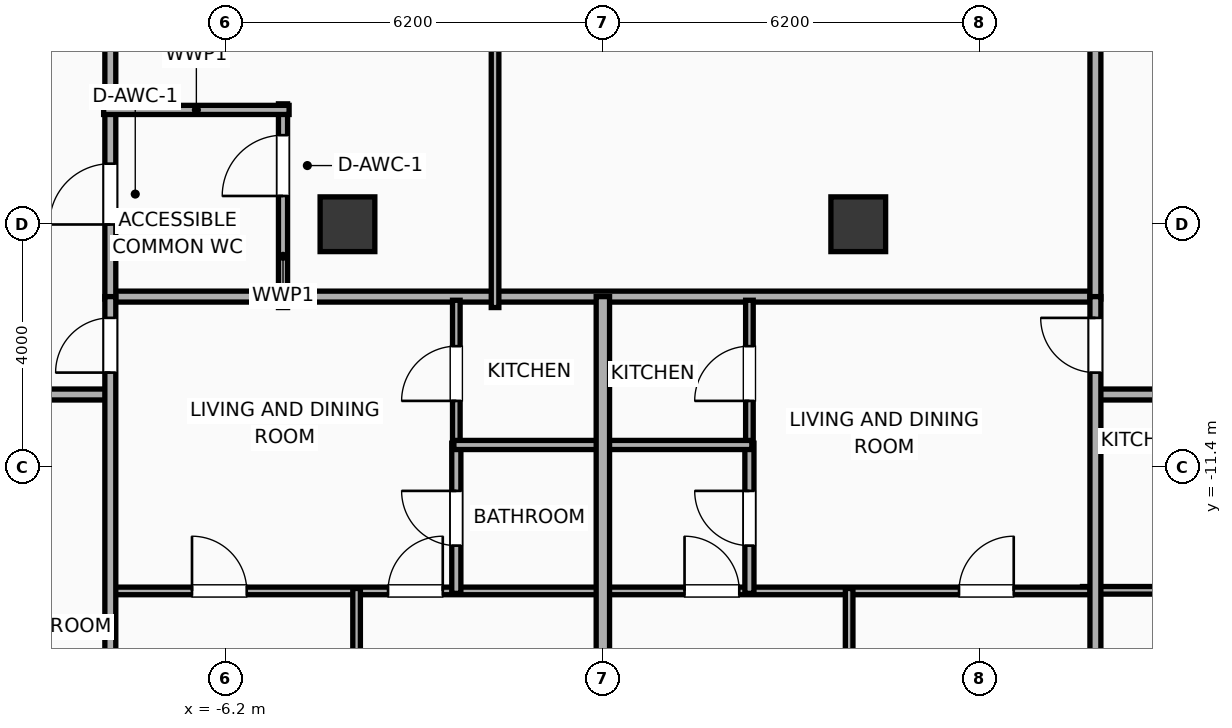
"""IFC4 building model, lengths in metres.
Left out: names, types, materials, properties, quantities, classifications, styles, units other than length and angle.
Written with IfcOpenShell. Run it as: python <this file> out.ifc"""

import sys

from ifc_helpers import new_model, si_unit, direction, frame, frame_2d, origin, origin_2d, place, context, subcontext, project, spatial, rectangle, extrude, element, fill, save


model = new_model("IFC4")
c1 = context("Model", 3, precision=1e-05, world=origin(), true_north=direction((0.0, 1.0)))
c2 = subcontext(c1, "Body", "Model", "MODEL_VIEW")
j1 = project(units=[si_unit("LENGTHUNIT", "METRE"), si_unit("PLANEANGLEUNIT", "RADIAN")], contexts=[c1])
p1 = place(None, origin())
s1 = spatial("IfcSite", under=j1, at=p1, CompositionType="ELEMENT")
p2 = place(p1, origin())
s2 = spatial("IfcBuilding", under=s1, at=p2, CompositionType="ELEMENT")
p3 = place(p2, frame((0.0, 0.0, 295.1)))
s3 = spatial("IfcBuildingStorey", under=s2, at=p3, CompositionType="ELEMENT", Elevation=295.1)
for number, where, z_axis, x_axis in (
    (1, (-4.2, -7.4, 0.0), (0.0, 0.0, 1.0), (1.0, 0.0, 0.0)),
    (2, (4.2, -7.4, 0.0), (0.0, 0.0, 1.0), (1.0, 0.0, 0.0)),
):
    element("IfcColumn", number, at=place(p3, frame(where, z_axis=z_axis, x_axis=x_axis)), inside=s3, PredefinedType="COLUMN", context=c2, shape_type="SweptSolid", body=[
        extrude(rectangle(XDim=0.9, YDim=0.9, at=origin_2d()), origin(), (0.0, 0.0, 1.0), 3.9),
    ])
p4 = place(p3, frame((-8.15, -8.59, 0.0), z_axis=(0.0, 0.0, 1.0), x_axis=(1.0, 0.0, 0.0)))
e3 = element("IfcWall", 3, at=p4, inside=s3, PredefinedType="PARTITIONING", context=c2, shape_type="SweptSolid", body=[
    extrude(rectangle(XDim=16.3, YDim=0.18, at=frame_2d((8.15, 0.0))), origin(), (0.0, 0.0, 1.0), 3.635),
])
p5 = place(p3, frame((-8.1, -8.63, 0.0), z_axis=(0.0, 0.0, 1.0), x_axis=(0.0, 1.0, 0.0)))
e4 = element("IfcWall", 4, at=p5, inside=s3, PredefinedType="PARTITIONING", context=c2, shape_type="SweptSolid", body=[
    extrude(rectangle(XDim=17.26, YDim=0.18, at=frame_2d((8.63, 0.0))), origin(), (0.0, 0.0, 1.0), 3.635),
])
p6 = place(p5, frame((1.226, 0.0, 0.0)))
e5 = element("IfcOpeningElement", 5, at=p6, cuts=e4, PredefinedType="OPENING", context=c2, shape_type="SweptSolid", body=[
    extrude(rectangle(XDim=1.0, YDim=2.05, at=frame_2d((0.5, 1.025))), frame((0.0, 0.1, 0.0), z_axis=(0.0, -1.0, 0.0), x_axis=(1.0, 0.0, 0.0)), (0.0, 0.0, 1.0), 0.2),
])
p7 = place(p5, frame((9.881, 0.0, 0.0)))
e6 = element("IfcOpeningElement", 6, at=p7, cuts=e4, PredefinedType="OPENING", context=c2, shape_type="SweptSolid", body=[
    extrude(rectangle(XDim=0.95, YDim=2.05, at=frame_2d((0.475, 1.025))), frame((0.0, 0.1, 0.0), z_axis=(0.0, -1.0, 0.0), x_axis=(1.0, 0.0, 0.0)), (0.0, 0.0, 1.0), 0.2),
])
p8 = place(p3, frame((8.1, -8.63, 0.0), z_axis=(0.0, 0.0, 1.0), x_axis=(0.0, 1.0, 0.0)))
e7 = element("IfcWall", 7, at=p8, inside=s3, PredefinedType="PARTITIONING", context=c2, shape_type="SweptSolid", body=[
    extrude(rectangle(XDim=17.26, YDim=0.18, at=frame_2d((8.63, 0.0))), origin(), (0.0, 0.0, 1.0), 3.635),
])
p9 = place(p3, frame((-5.26, -8.77, 0.0), z_axis=(0.0, 0.0, 1.0), x_axis=(0.0, 1.0, 0.0)))
e8 = element("IfcWall", 8, at=p9, inside=s3, PredefinedType="PLUMBINGWALL", context=c2, shape_type="SweptSolid", body=[
    extrude(rectangle(XDim=3.35, YDim=0.15, at=frame_2d((1.675, 0.0))), origin(), (0.0, 0.0, 1.0), 3.635),
])
p10 = place(p9, frame((1.835, 0.0, 0.0)))
e9 = element("IfcOpeningElement", 9, at=p10, cuts=e8, PredefinedType="OPENING", context=c2, shape_type="SweptSolid", body=[
    extrude(rectangle(XDim=1.0, YDim=2.05, at=frame_2d((0.5, 1.025))), frame((0.0, 0.085, 0.0), z_axis=(0.0, -1.0, 0.0), x_axis=(1.0, 0.0, 0.0)), (0.0, 0.0, 1.0), 0.17),
])
p11 = place(p3, frame((-8.21, -5.52, 0.0), z_axis=(0.0, 0.0, 1.0), x_axis=(1.0, 0.0, 0.0)))
e10 = element("IfcWall", 10, at=p11, inside=s3, PredefinedType="PLUMBINGWALL", context=c2, shape_type="SweptSolid", body=[
    extrude(rectangle(XDim=3.05, YDim=0.15, at=frame_2d((1.525, 0.0))), origin(), (0.0, 0.0, 1.0), 3.635),
])
p12 = place(p3, frame((-1.773, -8.77, 0.0), z_axis=(0.0, 0.0, 1.0), x_axis=(0.0, 1.0, 0.0)))
e11 = element("IfcWall", 11, at=p12, inside=s3, PredefinedType="PARTITIONING", context=c2, shape_type="SweptSolid", body=[
    extrude(rectangle(XDim=17.49, YDim=0.125, at=frame_2d((8.745, 0.0))), origin(), (0.0, 0.0, 1.0), 3.635),
])
p13 = place(p12, frame((8.27, 0.0, 0.0)))
e12 = element("IfcOpeningElement", 12, at=p13, cuts=e11, PredefinedType="OPENING", context=c2, shape_type="SweptSolid", body=[
    extrude(rectangle(XDim=0.95, YDim=2.05, at=frame_2d((0.475, 1.025))), frame((0.0, 0.073, 0.0), z_axis=(0.0, -1.0, 0.0), x_axis=(1.0, 0.0, 0.0)), (0.0, 0.0, 1.0), 0.145),
])
p14 = place(p3, frame((7.887, -13.42, 0.0), z_axis=(0.0, 0.0, 1.0), x_axis=(1.0, 0.0, 0.0)))
e13 = element("IfcWall", 13, at=p14, inside=s3, PredefinedType="PARTITIONING", context=c2, shape_type="SweptSolid", body=[
    extrude(rectangle(XDim=2.623, YDim=0.125, at=frame_2d((1.311, 0.0))), origin(), (0.0, 0.0, 1.0), 3.635),
])
p15 = place(p3, frame((-30.65, -10.2, 0.0), z_axis=(0.0, 0.0, 1.0), x_axis=(1.0, 0.0, 0.0)))
e14 = element("IfcWall", 14, at=p15, inside=s3, PredefinedType="PARTITIONING", context=c2, shape_type="SweptSolid", body=[
    extrude(rectangle(XDim=22.57, YDim=0.18, at=frame_2d((11.285, 0.0))), origin(), (0.0, 0.0, 1.0), 3.635),
])
p16 = place(p15, frame((2.308, 0.0, 0.0)))
e15 = element("IfcOpeningElement", 15, at=p16, cuts=e14, PredefinedType="OPENING", context=c2, shape_type="SweptSolid", body=[
    extrude(rectangle(XDim=0.9, YDim=2.05, at=frame_2d((0.45, 1.025))), frame((0.0, 0.1, 0.0), z_axis=(0.0, -1.0, 0.0), x_axis=(1.0, 0.0, 0.0)), (0.0, 0.0, 1.0), 0.2),
])
p17 = place(p15, frame((8.821, 0.0, 0.0)))
e16 = element("IfcOpeningElement", 16, at=p17, cuts=e14, PredefinedType="OPENING", context=c2, shape_type="SweptSolid", body=[
    extrude(rectangle(XDim=1.15, YDim=2.05, at=frame_2d((0.575, 1.025))), frame((0.0, 0.1, 0.0), z_axis=(0.0, -1.0, 0.0), x_axis=(1.0, 0.0, 0.0)), (0.0, 0.0, 1.0), 0.2),
])
p18 = place(p15, frame((13.749, 0.0, 0.0)))
e17 = element("IfcOpeningElement", 17, at=p18, cuts=e14, PredefinedType="OPENING", context=c2, shape_type="SweptSolid", body=[
    extrude(rectangle(XDim=0.9, YDim=2.05, at=frame_2d((0.45, 1.025))), frame((0.0, 0.1, 0.0), z_axis=(0.0, -1.0, 0.0), x_axis=(1.0, 0.0, 0.0)), (0.0, 0.0, 1.0), 0.2),
])
p19 = place(p15, frame((20.221, 0.0, 0.0)))
e18 = element("IfcOpeningElement", 18, at=p19, cuts=e14, PredefinedType="OPENING", context=c2, shape_type="SweptSolid", body=[
    extrude(rectangle(XDim=1.15, YDim=2.05, at=frame_2d((0.575, 1.025))), frame((0.0, 0.1, 0.0), z_axis=(0.0, -1.0, 0.0), x_axis=(1.0, 0.0, 0.0)), (0.0, 0.0, 1.0), 0.2),
])
p20 = place(p3, frame((8.08, -10.2, 0.0), z_axis=(0.0, 0.0, 1.0), x_axis=(1.0, 0.0, 0.0)))
e19 = element("IfcWall", 19, at=p20, inside=s3, PredefinedType="PARTITIONING", context=c2, shape_type="SweptSolid", body=[
    extrude(rectangle(XDim=15.226, YDim=0.18, at=frame_2d((7.613, 0.0))), origin(), (0.0, 0.0, 1.0), 3.635),
])
p21 = place(p20, frame((3.397, 0.0, 0.0)))
e20 = element("IfcOpeningElement", 20, at=p21, cuts=e19, PredefinedType="OPENING", context=c2, shape_type="SweptSolid", body=[
    extrude(rectangle(XDim=1.15, YDim=2.05, at=frame_2d((0.575, 1.025))), frame((0.0, 0.1, 0.0), z_axis=(0.0, -1.0, 0.0), x_axis=(1.0, 0.0, 0.0)), (0.0, 0.0, 1.0), 0.2),
])
p22 = place(p20, frame((11.042, 0.0, 0.0)))
e21 = element("IfcOpeningElement", 21, at=p22, cuts=e19, PredefinedType="OPENING", context=c2, shape_type="SweptSolid", body=[
    extrude(rectangle(XDim=1.15, YDim=2.05, at=frame_2d((0.575, 1.025))), frame((0.0, 0.1, 0.0), z_axis=(0.0, -1.0, 0.0), x_axis=(1.0, 0.0, 0.0)), (0.0, 0.0, 1.0), 0.2),
])
p23 = place(p3, frame((-8.08, -13.43, 0.0), z_axis=(0.0, 0.0, 1.0), x_axis=(1.0, 0.0, 0.0)))
e22 = element("IfcWall", 22, at=p23, inside=s3, PredefinedType="PARTITIONING", context=c2, shape_type="SweptSolid", body=[
    extrude(rectangle(XDim=8.06, YDim=0.125, at=frame_2d((4.03, 0.0))), origin(), (0.0, 0.0, 1.0), 3.635),
])
p24 = place(p23, frame((1.323, 0.0, 0.0)))
e23 = element("IfcOpeningElement", 23, at=p24, cuts=e22, PredefinedType="OPENING", context=c2, shape_type="SweptSolid", body=[
    extrude(rectangle(XDim=0.9, YDim=2.05, at=frame_2d((0.45, 1.025))), frame((0.0, 0.073, 0.0), z_axis=(0.0, -1.0, 0.0), x_axis=(1.0, 0.0, 0.0)), (0.0, 0.0, 1.0), 0.145),
])
p25 = place(p23, frame((4.547, 0.0, 0.0)))
e24 = element("IfcOpeningElement", 24, at=p25, cuts=e22, PredefinedType="OPENING", context=c2, shape_type="SweptSolid", body=[
    extrude(rectangle(XDim=0.9, YDim=2.05, at=frame_2d((0.45, 1.025))), frame((0.0, 0.073, 0.0), z_axis=(0.0, -1.0, 0.0), x_axis=(1.0, 0.0, 0.0)), (0.0, 0.0, 1.0), 0.145),
])
p26 = place(p3, frame((-2.41, -11.06, 0.0), z_axis=(0.0, 0.0, 1.0), x_axis=(0.0, 1.0, 0.0)))
e25 = element("IfcWall", 25, at=p26, inside=s3, PredefinedType="PARTITIONING", context=c2, shape_type="SweptSolid", body=[
    extrude(rectangle(XDim=2.41, YDim=0.125, at=frame_2d((1.205, 0.0))), origin(), (0.0, 0.0, 1.0), 3.635),
])
p27 = place(p26, frame((0.755, 0.0, 0.0)))
e26 = element("IfcOpeningElement", 26, at=p27, cuts=e25, PredefinedType="OPENING", context=c2, shape_type="SweptSolid", body=[
    extrude(rectangle(XDim=0.9, YDim=2.05, at=frame_2d((0.45, 1.025))), frame((0.0, 0.073, 0.0), z_axis=(0.0, -1.0, 0.0), x_axis=(1.0, 0.0, 0.0)), (0.0, 0.0, 1.0), 0.145),
])
p28 = place(p3, frame((-2.41, -13.47, 0.0), z_axis=(0.0, 0.0, 1.0), x_axis=(0.0, 1.0, 0.0)))
e27 = element("IfcWall", 27, at=p28, inside=s3, PredefinedType="PLUMBINGWALL", context=c2, shape_type="SweptSolid", body=[
    extrude(rectangle(XDim=2.47, YDim=0.15, at=frame_2d((1.235, 0.0))), origin(), (0.0, 0.0, 1.0), 3.635),
])
p29 = place(p28, frame((0.785, 0.0, 0.0)))
e28 = element("IfcOpeningElement", 28, at=p29, cuts=e27, PredefinedType="OPENING", context=c2, shape_type="SweptSolid", body=[
    extrude(rectangle(XDim=0.9, YDim=2.05, at=frame_2d((0.45, 1.025))), frame((0.0, 0.085, 0.0), z_axis=(0.0, -1.0, 0.0), x_axis=(1.0, 0.0, 0.0)), (0.0, 0.0, 1.0), 0.17),
])
p30 = place(p3, frame((-2.45, -11.03, 0.0), z_axis=(0.0, 0.0, 1.0), x_axis=(1.0, 0.0, 0.0)))
e29 = element("IfcWall", 29, at=p30, inside=s3, PredefinedType="PLUMBINGWALL", context=c2, shape_type="SweptSolid", body=[
    extrude(rectangle(XDim=2.43, YDim=0.15, at=frame_2d((1.215, 0.0))), origin(), (0.0, 0.0, 1.0), 3.635),
])
p31 = place(p3, frame((-4.05, -18.58, 0.0), z_axis=(0.0, 0.0, 1.0), x_axis=(0.0, 1.0, 0.0)))
e30 = element("IfcWall", 30, at=p31, inside=s3, PredefinedType="PARTITIONING", context=c2, shape_type="SweptSolid", body=[
    extrude(rectangle(XDim=5.19, YDim=0.125, at=frame_2d((2.595, 0.0))), origin(), (0.0, 0.0, 1.0), 3.635),
])
p32 = place(p3, frame((-8.1, -18.155, 0.0), z_axis=(0.0, 0.0, 1.0), x_axis=(0.0, 1.0, 0.0)))
e31 = element("IfcWall", 31, at=p32, inside=s3, PredefinedType="PARTITIONING", context=c2, shape_type="SweptSolid", body=[
    extrude(rectangle(XDim=9.564, YDim=0.18, at=frame_2d((4.782, 0.0))), origin(), (0.0, 0.0, 1.0), 3.635),
])
p33 = place(p32, frame((8.315, 0.0, 0.0)))
e32 = element("IfcOpeningElement", 32, at=p33, cuts=e31, PredefinedType="OPENING", context=c2, shape_type="SweptSolid", body=[
    extrude(rectangle(XDim=0.9, YDim=2.05, at=frame_2d((0.45, 1.025))), frame((0.0, 0.1, 0.0), z_axis=(0.0, -1.0, 0.0), x_axis=(1.0, 0.0, 0.0)), (0.0, 0.0, 1.0), 0.2),
])
p34 = place(p3, frame((0.02, -13.43, 0.0), z_axis=(0.0, 0.0, 1.0), x_axis=(1.0, 0.0, 0.0)))
e33 = element("IfcWall", 33, at=p34, inside=s3, PredefinedType="PARTITIONING", context=c2, shape_type="SweptSolid", body=[
    extrude(rectangle(XDim=7.992, YDim=0.125, at=frame_2d((3.996, 0.0))), origin(), (0.0, 0.0, 1.0), 3.635),
])
p35 = place(p34, frame((1.323, 0.0, 0.0)))
e34 = element("IfcOpeningElement", 34, at=p35, cuts=e33, PredefinedType="OPENING", context=c2, shape_type="SweptSolid", body=[
    extrude(rectangle(XDim=0.9, YDim=2.05, at=frame_2d((0.45, 1.025))), frame((0.0, 0.073, 0.0), z_axis=(0.0, -1.0, 0.0), x_axis=(1.0, 0.0, 0.0)), (0.0, 0.0, 1.0), 0.145),
])
p36 = place(p34, frame((5.837, 0.0, 0.0)))
e35 = element("IfcOpeningElement", 35, at=p36, cuts=e33, PredefinedType="OPENING", context=c2, shape_type="SweptSolid", body=[
    extrude(rectangle(XDim=0.9, YDim=2.05, at=frame_2d((0.45, 1.025))), frame((0.0, 0.073, 0.0), z_axis=(0.0, -1.0, 0.0), x_axis=(1.0, 0.0, 0.0)), (0.0, 0.0, 1.0), 0.145),
])
p37 = place(p3, frame((2.41, -11.06, 0.0), z_axis=(0.0, 0.0, 1.0), x_axis=(0.0, 1.0, 0.0)))
e36 = element("IfcWall", 36, at=p37, inside=s3, PredefinedType="PARTITIONING", context=c2, shape_type="SweptSolid", body=[
    extrude(rectangle(XDim=2.41, YDim=0.125, at=frame_2d((1.205, 0.0))), origin(), (0.0, 0.0, 1.0), 3.635),
])
p38 = place(p37, frame((0.755, 0.0, 0.0)))
e37 = element("IfcOpeningElement", 37, at=p38, cuts=e36, PredefinedType="OPENING", context=c2, shape_type="SweptSolid", body=[
    extrude(rectangle(XDim=0.9, YDim=2.05, at=frame_2d((0.45, 1.025))), frame((0.0, 0.073, 0.0), z_axis=(0.0, -1.0, 0.0), x_axis=(1.0, 0.0, 0.0)), (0.0, 0.0, 1.0), 0.145),
])
p39 = place(p3, frame((2.41, -13.47, 0.0), z_axis=(0.0, 0.0, 1.0), x_axis=(0.0, 1.0, 0.0)))
e38 = element("IfcWall", 38, at=p39, inside=s3, PredefinedType="PLUMBINGWALL", context=c2, shape_type="SweptSolid", body=[
    extrude(rectangle(XDim=2.47, YDim=0.15, at=frame_2d((1.235, 0.0))), origin(), (0.0, 0.0, 1.0), 3.075),
])
p40 = place(p39, frame((0.785, 0.0, 0.0)))
e39 = element("IfcOpeningElement", 39, at=p40, cuts=e38, PredefinedType="OPENING", context=c2, shape_type="SweptSolid", body=[
    extrude(rectangle(XDim=0.9, YDim=2.05, at=frame_2d((0.45, 1.025))), frame((0.0, 0.085, 0.0), z_axis=(0.0, -1.0, 0.0), x_axis=(1.0, 0.0, 0.0)), (0.0, 0.0, 1.0), 0.17),
])
p41 = place(p3, frame((0.02, -11.03, 0.0), z_axis=(0.0, 0.0, 1.0), x_axis=(1.0, 0.0, 0.0)))
e40 = element("IfcWall", 40, at=p41, inside=s3, PredefinedType="PLUMBINGWALL", context=c2, shape_type="SweptSolid", body=[
    extrude(rectangle(XDim=2.43, YDim=0.15, at=frame_2d((1.215, 0.0))), origin(), (0.0, 0.0, 1.0), 3.635),
])
p42 = place(p3, frame((4.05, -19.432, 0.0), z_axis=(0.0, 0.0, 1.0), x_axis=(0.0, 1.0, 0.0)))
e41 = element("IfcWall", 41, at=p42, inside=s3, PredefinedType="PARTITIONING", context=c2, shape_type="SweptSolid", body=[
    extrude(rectangle(XDim=6.042, YDim=0.125, at=frame_2d((3.021, 0.0))), origin(), (0.0, 0.0, 1.0), 3.635),
])
p43 = place(p3, frame((8.1, -19.857, 0.0), z_axis=(0.0, 0.0, 1.0), x_axis=(0.0, 1.0, 0.0)))
e42 = element("IfcWall", 42, at=p43, inside=s3, PredefinedType="PARTITIONING", context=c2, shape_type="SweptSolid", body=[
    extrude(rectangle(XDim=11.267, YDim=0.18, at=frame_2d((5.634, 0.0))), origin(), (0.0, 0.0, 1.0), 3.635),
])
p44 = place(p43, frame((10.017, 0.0, 0.0)))
e43 = element("IfcOpeningElement", 43, at=p44, cuts=e42, PredefinedType="OPENING", context=c2, shape_type="SweptSolid", body=[
    extrude(rectangle(XDim=0.9, YDim=2.05, at=frame_2d((0.45, 1.025))), frame((0.0, 0.1, 0.0), z_axis=(0.0, -1.0, 0.0), x_axis=(1.0, 0.0, 0.0)), (0.0, 0.0, 1.0), 0.2),
])
p45 = place(p3, frame((0.0, -19.006, 0.0), z_axis=(0.0, 0.0, 1.0), x_axis=(0.0, 1.0, 0.0)))
e44 = element("IfcWall", 44, at=p45, inside=s3, PredefinedType="PARTITIONING", context=c2, shape_type="SweptSolid", body=[
    extrude(rectangle(XDim=10.416, YDim=0.22, at=frame_2d((5.208, 0.0))), origin(), (0.0, 0.0, 1.0), 3.635),
])
p46 = place(p6, origin())
e45 = element("IfcDoor", 45, at=p46, inside=s3, OperationType="SINGLE_SWING_LEFT", PredefinedType="DOOR", context=c2, shape_type="SweptSolid", body=[
    extrude(rectangle(XDim=1.0, YDim=2.05, at=frame_2d((0.5, 1.025))), frame((0.0, 0.025, 0.0), z_axis=(0.0, -1.0, 0.0), x_axis=(1.0, 0.0, 0.0)), (0.0, 0.0, 1.0), 0.05),
])
fill(e5, e45)
p47 = place(p10, origin())
e46 = element("IfcDoor", 46, at=p47, inside=s3, OperationType="SINGLE_SWING_LEFT", PredefinedType="DOOR", context=c2, shape_type="SweptSolid", body=[
    extrude(rectangle(XDim=1.0, YDim=2.05, at=frame_2d((0.5, 1.025))), frame((0.0, 0.025, 0.0), z_axis=(0.0, -1.0, 0.0), x_axis=(1.0, 0.0, 0.0)), (0.0, 0.0, 1.0), 0.05),
])
fill(e9, e46)
p48 = place(p24, origin())
e47 = element("IfcDoor", 47, at=p48, inside=s3, OperationType="SINGLE_SWING_LEFT", PredefinedType="DOOR", context=c2, shape_type="SweptSolid", body=[
    extrude(rectangle(XDim=0.9, YDim=2.05, at=frame_2d((0.45, 1.025))), frame((0.0, 0.025, 0.0), z_axis=(0.0, -1.0, 0.0), x_axis=(1.0, 0.0, 0.0)), (0.0, 0.0, 1.0), 0.05),
])
fill(e23, e47)
p49 = place(p25, origin())
e48 = element("IfcDoor", 48, at=p49, inside=s3, OperationType="SINGLE_SWING_RIGHT", PredefinedType="DOOR", context=c2, shape_type="SweptSolid", body=[
    extrude(rectangle(XDim=0.9, YDim=2.05, at=frame_2d((0.45, 1.025))), frame((0.0, 0.025, 0.0), z_axis=(0.0, -1.0, 0.0), x_axis=(1.0, 0.0, 0.0)), (0.0, 0.0, 1.0), 0.05),
])
fill(e24, e48)
p50 = place(p27, origin())
e49 = element("IfcDoor", 49, at=p50, inside=s3, OperationType="SINGLE_SWING_LEFT", PredefinedType="DOOR", context=c2, shape_type="SweptSolid", body=[
    extrude(rectangle(XDim=0.9, YDim=2.05, at=frame_2d((0.45, 1.025))), frame((0.0, 0.025, 0.0), z_axis=(0.0, -1.0, 0.0), x_axis=(1.0, 0.0, 0.0)), (0.0, 0.0, 1.0), 0.05),
])
fill(e26, e49)
p51 = place(p29, origin())
e50 = element("IfcDoor", 50, at=p51, inside=s3, OperationType="SINGLE_SWING_RIGHT", PredefinedType="DOOR", context=c2, shape_type="SweptSolid", body=[
    extrude(rectangle(XDim=0.9, YDim=2.05, at=frame_2d((0.45, 1.025))), frame((0.0, 0.025, 0.0), z_axis=(0.0, -1.0, 0.0), x_axis=(1.0, 0.0, 0.0)), (0.0, 0.0, 1.0), 0.05),
])
fill(e28, e50)
p52 = place(p33, origin())
e51 = element("IfcDoor", 51, at=p52, inside=s3, OperationType="SINGLE_SWING_LEFT", PredefinedType="DOOR", context=c2, shape_type="SweptSolid", body=[
    extrude(rectangle(XDim=0.9, YDim=2.05, at=frame_2d((0.45, 1.025))), frame((0.0, 0.025, 0.0), z_axis=(0.0, -1.0, 0.0), x_axis=(1.0, 0.0, 0.0)), (0.0, 0.0, 1.0), 0.05),
])
fill(e32, e51)
p53 = place(p35, origin())
e52 = element("IfcDoor", 52, at=p53, inside=s3, OperationType="SINGLE_SWING_LEFT", PredefinedType="DOOR", context=c2, shape_type="SweptSolid", body=[
    extrude(rectangle(XDim=0.9, YDim=2.05, at=frame_2d((0.45, 1.025))), frame((0.0, 0.025, 0.0), z_axis=(0.0, -1.0, 0.0), x_axis=(1.0, 0.0, 0.0)), (0.0, 0.0, 1.0), 0.05),
])
fill(e34, e52)
p54 = place(p36, origin())
e53 = element("IfcDoor", 53, at=p54, inside=s3, OperationType="SINGLE_SWING_RIGHT", PredefinedType="DOOR", context=c2, shape_type="SweptSolid", body=[
    extrude(rectangle(XDim=0.9, YDim=2.05, at=frame_2d((0.45, 1.025))), frame((0.0, 0.025, 0.0), z_axis=(0.0, -1.0, 0.0), x_axis=(1.0, 0.0, 0.0)), (0.0, 0.0, 1.0), 0.05),
])
fill(e35, e53)
p55 = place(p38, origin())
e54 = element("IfcDoor", 54, at=p55, inside=s3, OperationType="SINGLE_SWING_LEFT", PredefinedType="DOOR", context=c2, shape_type="SweptSolid", body=[
    extrude(rectangle(XDim=0.9, YDim=2.05, at=frame_2d((0.45, 1.025))), frame((0.0, 0.025, 0.0), z_axis=(0.0, -1.0, 0.0), x_axis=(1.0, 0.0, 0.0)), (0.0, 0.0, 1.0), 0.05),
])
fill(e37, e54)
p56 = place(p40, origin())
e55 = element("IfcDoor", 55, at=p56, inside=s3, OperationType="SINGLE_SWING_RIGHT", PredefinedType="DOOR", context=c2, shape_type="SweptSolid", body=[
    extrude(rectangle(XDim=0.9, YDim=2.05, at=frame_2d((0.45, 1.025))), frame((0.0, 0.025, 0.0), z_axis=(0.0, -1.0, 0.0), x_axis=(1.0, 0.0, 0.0)), (0.0, 0.0, 1.0), 0.05),
])
fill(e39, e55)
p57 = place(p44, origin())
e56 = element("IfcDoor", 56, at=p57, inside=s3, OperationType="SINGLE_SWING_RIGHT", PredefinedType="DOOR", context=c2, shape_type="SweptSolid", body=[
    extrude(rectangle(XDim=0.9, YDim=2.05, at=frame_2d((0.45, 1.025))), frame((0.0, 0.025, 0.0), z_axis=(0.0, -1.0, 0.0), x_axis=(1.0, 0.0, 0.0)), (0.0, 0.0, 1.0), 0.05),
])
fill(e43, e56)
save(model, sys.argv[1])
